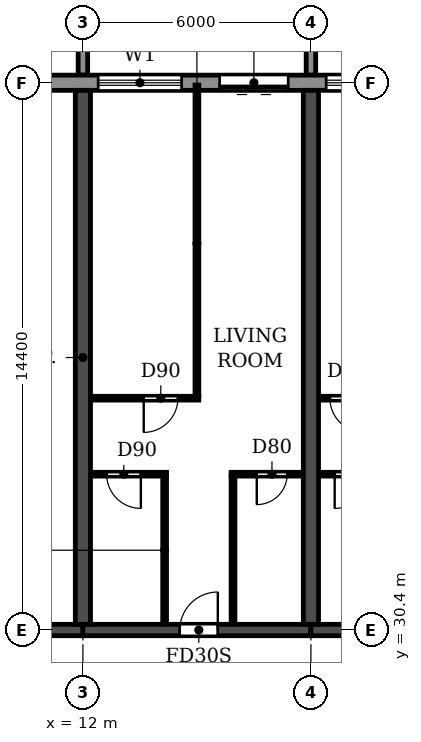
"""IFC4 building model, lengths in metres.
Left out: names, types, materials, properties, quantities, classifications, styles, units other than length and angle.
Written with IfcOpenShell. Run it as: python <this file> out.ifc"""

import sys

from ifc_helpers import new_model, si_unit, direction, frame, frame_2d, origin, place, context, subcontext, project, spatial, polyline, rectangle, outline, extrude, source, transform, mapped, element, fill, save


model = new_model("IFC4")
c1 = context("Model", 3, precision=1e-05, world=origin(), true_north=direction((0.0, 1.0)))
c2 = subcontext(c1, "Body", "Model", "MODEL_VIEW")
j1 = project(units=[si_unit("LENGTHUNIT", "METRE"), si_unit("PLANEANGLEUNIT", "RADIAN")], contexts=[c1])
p1 = place(None, origin())
s1 = spatial("IfcSite", under=j1, at=p1, CompositionType="ELEMENT")
p2 = place(p1, origin())
s2 = spatial("IfcBuilding", under=s1, at=p2, CompositionType="ELEMENT")
p3 = place(p2, frame((0.0, 0.0, 56.4)))
s3 = spatial("IfcBuildingStorey", under=s2, at=p3, CompositionType="ELEMENT", Elevation=56.4)
for number, where, z_axis, x_axis in (
    (1, (12.0, 30.55, 0.0), (0.0, 0.0, 1.0), (0.0, 1.0, 0.0)),
    (2, (18.0, 30.55, 0.0), (0.0, 0.0, 1.0), (0.0, 1.0, 0.0)),
):
    element("IfcWall", number, at=place(p3, frame(where, z_axis=z_axis, x_axis=x_axis)), inside=s3, PredefinedType="SHEAR", context=c2, shape_type="SweptSolid", body=[
        extrude(rectangle(XDim=14.05, YDim=0.4, at=frame_2d((7.025, 0.0))), origin(), (0.0, 0.0, 1.0), 3.05),
    ])
p4 = place(p3, frame((6.2, 30.4, 0.0), z_axis=(0.0, 0.0, 1.0), x_axis=(1.0, 0.0, 0.0)))
e3 = element("IfcWall", 3, at=p4, inside=s3, PredefinedType="SHEAR", context=c2, shape_type="SweptSolid", body=[
    extrude(rectangle(XDim=5.8, YDim=0.3, at=frame_2d((2.9, 0.0))), origin(), (0.0, 0.0, 1.0), 2.45),
])
p5 = place(p4, frame((2.3, 0.0, 0.0)))
e4 = element("IfcOpeningElement", 4, at=p5, cuts=e3, PredefinedType="OPENING", context=c2, shape_type="SweptSolid", body=[
    extrude(rectangle(XDim=1.0, YDim=2.1, at=frame_2d((0.5, 1.05))), frame((0.0, 0.16, 0.0), z_axis=(0.0, -1.0, 0.0), x_axis=(1.0, 0.0, 0.0)), (0.0, 0.0, 1.0), 0.32),
])
p6 = place(p3, frame((12.0, 30.4, 0.0), z_axis=(0.0, 0.0, 1.0), x_axis=(1.0, 0.0, 0.0)))
e5 = element("IfcWall", 5, at=p6, inside=s3, PredefinedType="SHEAR", context=c2, shape_type="SweptSolid", body=[
    extrude(rectangle(XDim=6.0, YDim=0.3, at=frame_2d((3.0, 0.0))), origin(), (0.0, 0.0, 1.0), 2.45),
])
p7 = place(p6, frame((2.55, 0.0, 0.0)))
e6 = element("IfcOpeningElement", 6, at=p7, cuts=e5, PredefinedType="OPENING", context=c2, shape_type="SweptSolid", body=[
    extrude(rectangle(XDim=1.0, YDim=2.1, at=frame_2d((0.5, 1.05))), frame((0.0, 0.16, 0.0), z_axis=(0.0, -1.0, 0.0), x_axis=(1.0, 0.0, 0.0)), (0.0, 0.0, 1.0), 0.32),
])
p8 = place(p3, frame((18.0, 30.4, 0.0), z_axis=(0.0, 0.0, 1.0), x_axis=(1.0, 0.0, 0.0)))
e7 = element("IfcWall", 7, at=p8, inside=s3, PredefinedType="SHEAR", context=c2, shape_type="SweptSolid", body=[
    extrude(rectangle(XDim=6.0, YDim=0.3, at=frame_2d((3.0, 0.0))), origin(), (0.0, 0.0, 1.0), 2.45),
])
p9 = place(p8, frame((2.55, 0.0, 0.0)))
e8 = element("IfcOpeningElement", 8, at=p9, cuts=e7, PredefinedType="OPENING", context=c2, shape_type="SweptSolid", body=[
    extrude(rectangle(XDim=1.0, YDim=2.1, at=frame_2d((0.5, 1.05))), frame((0.0, 0.16, 0.0), z_axis=(0.0, -1.0, 0.0), x_axis=(1.0, 0.0, 0.0)), (0.0, 0.0, 1.0), 0.32),
])
p10 = place(p3, frame((91.317, 44.8, 0.0), z_axis=(0.0, 0.0, 1.0), x_axis=(-1.0, 0.0, 0.0)))
e9 = element("IfcWall", 9, at=p10, inside=s3, PredefinedType="STANDARD", context=c2, shape_type="SweptSolid", body=[
    extrude(rectangle(XDim=80.634, YDim=0.4, at=frame_2d((40.317, 0.0))), origin(), (0.0, 0.0, 1.0), 3.05),
])
p11 = place(p10, frame((76.717, 0.0, 0.9)))
e10 = element("IfcOpeningElement", 10, at=p11, cuts=e9, PredefinedType="OPENING", context=c2, shape_type="SweptSolid", body=[
    extrude(rectangle(XDim=2.2, YDim=1.5, at=frame_2d((1.1, 0.75))), frame((0.0, 0.21, 0.0), z_axis=(0.0, -1.0, 0.0), x_axis=(1.0, 0.0, 0.0)), (0.0, 0.0, 1.0), 0.42),
])
p12 = place(p10, frame((73.917, 0.0, 0.0)))
e11 = element("IfcOpeningElement", 11, at=p12, cuts=e9, PredefinedType="OPENING", context=c2, shape_type="SweptSolid", body=[
    extrude(rectangle(XDim=1.8, YDim=2.4, at=frame_2d((0.9, 1.2))), frame((0.0, 0.21, 0.0), z_axis=(0.0, -1.0, 0.0), x_axis=(1.0, 0.0, 0.0)), (0.0, 0.0, 1.0), 0.42),
])
p13 = place(p10, frame((70.717, 0.0, 0.9)))
e12 = element("IfcOpeningElement", 12, at=p13, cuts=e9, PredefinedType="OPENING", context=c2, shape_type="SweptSolid", body=[
    extrude(rectangle(XDim=2.2, YDim=1.5, at=frame_2d((1.1, 0.75))), frame((0.0, 0.21, 0.0), z_axis=(0.0, -1.0, 0.0), x_axis=(1.0, 0.0, 0.0)), (0.0, 0.0, 1.0), 0.42),
])
p14 = place(p10, frame((67.917, 0.0, 0.0)))
e13 = element("IfcOpeningElement", 13, at=p14, cuts=e9, PredefinedType="OPENING", context=c2, shape_type="SweptSolid", body=[
    extrude(rectangle(XDim=1.8, YDim=2.4, at=frame_2d((0.9, 1.2))), frame((0.0, 0.21, 0.0), z_axis=(0.0, -1.0, 0.0), x_axis=(1.0, 0.0, 0.0)), (0.0, 0.0, 1.0), 0.42),
])
p15 = place(p10, frame((64.717, 0.0, 0.9)))
e14 = element("IfcOpeningElement", 14, at=p15, cuts=e9, PredefinedType="OPENING", context=c2, shape_type="SweptSolid", body=[
    extrude(rectangle(XDim=2.2, YDim=1.5, at=frame_2d((1.1, 0.75))), frame((0.0, 0.21, 0.0), z_axis=(0.0, -1.0, 0.0), x_axis=(1.0, 0.0, 0.0)), (0.0, 0.0, 1.0), 0.42),
])
p16 = place(p10, frame((61.917, 0.0, 0.0)))
e15 = element("IfcOpeningElement", 15, at=p16, cuts=e9, PredefinedType="OPENING", context=c2, shape_type="SweptSolid", body=[
    extrude(rectangle(XDim=1.8, YDim=2.4, at=frame_2d((0.9, 1.2))), frame((0.0, 0.21, 0.0), z_axis=(0.0, -1.0, 0.0), x_axis=(1.0, 0.0, 0.0)), (0.0, 0.0, 1.0), 0.42),
])
p17 = place(p10, frame((58.717, 0.0, 0.9)))
e16 = element("IfcOpeningElement", 16, at=p17, cuts=e9, PredefinedType="OPENING", context=c2, shape_type="SweptSolid", body=[
    extrude(rectangle(XDim=2.2, YDim=1.5, at=frame_2d((1.1, 0.75))), frame((0.0, 0.21, 0.0), z_axis=(0.0, -1.0, 0.0), x_axis=(1.0, 0.0, 0.0)), (0.0, 0.0, 1.0), 0.42),
])
p18 = place(p10, frame((55.717, 0.0, 0.9)))
e17 = element("IfcOpeningElement", 17, at=p18, cuts=e9, PredefinedType="OPENING", context=c2, shape_type="SweptSolid", body=[
    extrude(rectangle(XDim=2.2, YDim=1.5, at=frame_2d((1.1, 0.75))), frame((0.0, 0.21, 0.0), z_axis=(0.0, -1.0, 0.0), x_axis=(1.0, 0.0, 0.0)), (0.0, 0.0, 1.0), 0.42),
])
p19 = place(p10, frame((52.917, 0.0, 0.0)))
e18 = element("IfcOpeningElement", 18, at=p19, cuts=e9, PredefinedType="OPENING", context=c2, shape_type="SweptSolid", body=[
    extrude(rectangle(XDim=1.8, YDim=2.4, at=frame_2d((0.9, 1.2))), frame((0.0, 0.21, 0.0), z_axis=(0.0, -1.0, 0.0), x_axis=(1.0, 0.0, 0.0)), (0.0, 0.0, 1.0), 0.42),
])
p20 = place(p10, frame((49.717, 0.0, 0.9)))
e19 = element("IfcOpeningElement", 19, at=p20, cuts=e9, PredefinedType="OPENING", context=c2, shape_type="SweptSolid", body=[
    extrude(rectangle(XDim=2.2, YDim=1.5, at=frame_2d((1.1, 0.75))), frame((0.0, 0.21, 0.0), z_axis=(0.0, -1.0, 0.0), x_axis=(1.0, 0.0, 0.0)), (0.0, 0.0, 1.0), 0.42),
])
p21 = place(p10, frame((46.917, 0.0, 0.0)))
e20 = element("IfcOpeningElement", 20, at=p21, cuts=e9, PredefinedType="OPENING", context=c2, shape_type="SweptSolid", body=[
    extrude(rectangle(XDim=1.8, YDim=2.4, at=frame_2d((0.9, 1.2))), frame((0.0, 0.21, 0.0), z_axis=(0.0, -1.0, 0.0), x_axis=(1.0, 0.0, 0.0)), (0.0, 0.0, 1.0), 0.42),
])
p22 = place(p10, frame((43.717, 0.0, 0.9)))
e21 = element("IfcOpeningElement", 21, at=p22, cuts=e9, PredefinedType="OPENING", context=c2, shape_type="SweptSolid", body=[
    extrude(rectangle(XDim=2.2, YDim=1.5, at=frame_2d((1.1, 0.75))), frame((0.0, 0.21, 0.0), z_axis=(0.0, -1.0, 0.0), x_axis=(1.0, 0.0, 0.0)), (0.0, 0.0, 1.0), 0.42),
])
p23 = place(p10, frame((40.717, 0.0, 0.9)))
e22 = element("IfcOpeningElement", 22, at=p23, cuts=e9, PredefinedType="OPENING", context=c2, shape_type="SweptSolid", body=[
    extrude(rectangle(XDim=2.2, YDim=1.5, at=frame_2d((1.1, 0.75))), frame((0.0, 0.21, 0.0), z_axis=(0.0, -1.0, 0.0), x_axis=(1.0, 0.0, 0.0)), (0.0, 0.0, 1.0), 0.42),
])
p24 = place(p10, frame((37.717, 0.0, 0.9)))
e23 = element("IfcOpeningElement", 23, at=p24, cuts=e9, PredefinedType="OPENING", context=c2, shape_type="SweptSolid", body=[
    extrude(rectangle(XDim=2.2, YDim=1.5, at=frame_2d((1.1, 0.75))), frame((0.0, 0.21, 0.0), z_axis=(0.0, -1.0, 0.0), x_axis=(1.0, 0.0, 0.0)), (0.0, 0.0, 1.0), 0.42),
])
p25 = place(p10, frame((34.717, 0.0, 0.9)))
e24 = element("IfcOpeningElement", 24, at=p25, cuts=e9, PredefinedType="OPENING", context=c2, shape_type="SweptSolid", body=[
    extrude(rectangle(XDim=2.2, YDim=1.5, at=frame_2d((1.1, 0.75))), frame((0.0, 0.21, 0.0), z_axis=(0.0, -1.0, 0.0), x_axis=(1.0, 0.0, 0.0)), (0.0, 0.0, 1.0), 0.42),
])
p26 = place(p10, frame((31.917, 0.0, 0.0)))
e25 = element("IfcOpeningElement", 25, at=p26, cuts=e9, PredefinedType="OPENING", context=c2, shape_type="SweptSolid", body=[
    extrude(rectangle(XDim=1.8, YDim=2.4, at=frame_2d((0.9, 1.2))), frame((0.0, 0.21, 0.0), z_axis=(0.0, -1.0, 0.0), x_axis=(1.0, 0.0, 0.0)), (0.0, 0.0, 1.0), 0.42),
])
p27 = place(p10, frame((28.917, 0.0, 0.0)))
e26 = element("IfcOpeningElement", 26, at=p27, cuts=e9, PredefinedType="OPENING", context=c2, shape_type="SweptSolid", body=[
    extrude(rectangle(XDim=1.8, YDim=2.4, at=frame_2d((0.9, 1.2))), frame((0.0, 0.21, 0.0), z_axis=(0.0, -1.0, 0.0), x_axis=(1.0, 0.0, 0.0)), (0.0, 0.0, 1.0), 0.42),
])
p28 = place(p10, frame((25.717, 0.0, 0.9)))
e27 = element("IfcOpeningElement", 27, at=p28, cuts=e9, PredefinedType="OPENING", context=c2, shape_type="SweptSolid", body=[
    extrude(rectangle(XDim=2.2, YDim=1.5, at=frame_2d((1.1, 0.75))), frame((0.0, 0.21, 0.0), z_axis=(0.0, -1.0, 0.0), x_axis=(1.0, 0.0, 0.0)), (0.0, 0.0, 1.0), 0.42),
])
p29 = place(p10, frame((22.917, 0.0, 0.0)))
e28 = element("IfcOpeningElement", 28, at=p29, cuts=e9, PredefinedType="OPENING", context=c2, shape_type="SweptSolid", body=[
    extrude(rectangle(XDim=1.8, YDim=2.4, at=frame_2d((0.9, 1.2))), frame((0.0, 0.21, 0.0), z_axis=(0.0, -1.0, 0.0), x_axis=(1.0, 0.0, 0.0)), (0.0, 0.0, 1.0), 0.42),
])
p30 = place(p10, frame((19.717, 0.0, 0.9)))
e29 = element("IfcOpeningElement", 29, at=p30, cuts=e9, PredefinedType="OPENING", context=c2, shape_type="SweptSolid", body=[
    extrude(rectangle(XDim=2.2, YDim=1.5, at=frame_2d((1.1, 0.75))), frame((0.0, 0.21, 0.0), z_axis=(0.0, -1.0, 0.0), x_axis=(1.0, 0.0, 0.0)), (0.0, 0.0, 1.0), 0.42),
])
p31 = place(p10, frame((16.917, 0.0, 0.0)))
e30 = element("IfcOpeningElement", 30, at=p31, cuts=e9, PredefinedType="OPENING", context=c2, shape_type="SweptSolid", body=[
    extrude(rectangle(XDim=1.8, YDim=2.4, at=frame_2d((0.9, 1.2))), frame((0.0, 0.21, 0.0), z_axis=(0.0, -1.0, 0.0), x_axis=(1.0, 0.0, 0.0)), (0.0, 0.0, 1.0), 0.42),
])
p32 = place(p10, frame((13.717, 0.0, 0.9)))
e31 = element("IfcOpeningElement", 31, at=p32, cuts=e9, PredefinedType="OPENING", context=c2, shape_type="SweptSolid", body=[
    extrude(rectangle(XDim=2.2, YDim=1.5, at=frame_2d((1.1, 0.75))), frame((0.0, 0.21, 0.0), z_axis=(0.0, -1.0, 0.0), x_axis=(1.0, 0.0, 0.0)), (0.0, 0.0, 1.0), 0.42),
])
p33 = place(p10, frame((10.917, 0.0, 0.0)))
e32 = element("IfcOpeningElement", 32, at=p33, cuts=e9, PredefinedType="OPENING", context=c2, shape_type="SweptSolid", body=[
    extrude(rectangle(XDim=1.8, YDim=2.4, at=frame_2d((0.9, 1.2))), frame((0.0, 0.21, 0.0), z_axis=(0.0, -1.0, 0.0), x_axis=(1.0, 0.0, 0.0)), (0.0, 0.0, 1.0), 0.42),
])
p34 = place(p10, frame((7.717, 0.0, 0.9)))
e33 = element("IfcOpeningElement", 33, at=p34, cuts=e9, PredefinedType="OPENING", context=c2, shape_type="SweptSolid", body=[
    extrude(rectangle(XDim=2.2, YDim=1.5, at=frame_2d((1.1, 0.75))), frame((0.0, 0.21, 0.0), z_axis=(0.0, -1.0, 0.0), x_axis=(1.0, 0.0, 0.0)), (0.0, 0.0, 1.0), 0.42),
])
p35 = place(p10, frame((4.717, 0.0, 0.9)))
e34 = element("IfcOpeningElement", 34, at=p35, cuts=e9, PredefinedType="OPENING", context=c2, shape_type="SweptSolid", body=[
    extrude(rectangle(XDim=2.2, YDim=1.5, at=frame_2d((1.1, 0.75))), frame((0.0, 0.21, 0.0), z_axis=(0.0, -1.0, 0.0), x_axis=(1.0, 0.0, 0.0)), (0.0, 0.0, 1.0), 0.42),
])
p36 = place(p10, frame((1.717, 0.0, 0.9)))
e35 = element("IfcOpeningElement", 35, at=p36, cuts=e9, PredefinedType="OPENING", context=c2, shape_type="SweptSolid", body=[
    extrude(rectangle(XDim=2.2, YDim=1.5, at=frame_2d((1.1, 0.75))), frame((0.0, 0.21, 0.0), z_axis=(0.0, -1.0, 0.0), x_axis=(1.0, 0.0, 0.0)), (0.0, 0.0, 1.0), 0.42),
])
m1 = source(origin(), c2, "Body", "SweptSolid", [
    extrude(outline(polyline([(0.0, 0.0), (0.25, 0.0), (0.25, 3.1), (0.0, 3.1), (0.0, 0.0)])), origin(), (0.0, 0.0, 1.0), 3.1),
])
for number, where in (
    (36, (11.875, 45.0, 0.0)),
    (37, (17.875, 45.0, 0.0)),
):
    element("IfcWall", number, at=place(p3, frame(where)), inside=s3, PredefinedType="STANDARD", context=c2, shape_type="MappedRepresentation", body=[
        mapped(m1, transform((0.0, 0.0, 0.0))),
    ])
p37 = place(p3, frame((12.21, 34.5, 0.0), z_axis=(0.0, 0.0, 1.0), x_axis=(1.0, 0.0, 0.0)))
e38 = element("IfcWall", 38, at=p37, inside=s3, PredefinedType="PARTITIONING", context=c2, shape_type="SweptSolid", body=[
    extrude(rectangle(XDim=1.99, YDim=0.1, at=frame_2d((0.995, 0.0))), origin(), (0.0, 0.0, 1.0), 3.05),
])
p38 = place(p37, frame((0.415, 0.0, 0.0)))
e39 = element("IfcOpeningElement", 39, at=p38, cuts=e38, PredefinedType="OPENING", context=c2, shape_type="SweptSolid", body=[
    extrude(rectangle(XDim=0.9, YDim=2.1, at=frame_2d((0.45, 1.05))), frame((0.0, 0.06, 0.0), z_axis=(0.0, -1.0, 0.0), x_axis=(1.0, 0.0, 0.0)), (0.0, 0.0, 1.0), 0.12),
])
p39 = place(p3, frame((15.9, 34.5, 0.0), z_axis=(0.0, 0.0, 1.0), x_axis=(1.0, 0.0, 0.0)))
e40 = element("IfcWall", 40, at=p39, inside=s3, PredefinedType="PARTITIONING", context=c2, shape_type="SweptSolid", body=[
    extrude(rectangle(XDim=1.89, YDim=0.1, at=frame_2d((0.945, 0.0))), origin(), (0.0, 0.0, 1.0), 3.05),
])
p40 = place(p39, frame((0.675, 0.0, 0.0)))
e41 = element("IfcOpeningElement", 41, at=p40, cuts=e40, PredefinedType="OPENING", context=c2, shape_type="SweptSolid", body=[
    extrude(rectangle(XDim=0.8, YDim=2.1, at=frame_2d((0.4, 1.05))), frame((0.0, 0.06, 0.0), z_axis=(0.0, -1.0, 0.0), x_axis=(1.0, 0.0, 0.0)), (0.0, 0.0, 1.0), 0.12),
])
p41 = place(p3, frame((18.21, 34.5, 0.0), z_axis=(0.0, 0.0, 1.0), x_axis=(1.0, 0.0, 0.0)))
e42 = element("IfcWall", 42, at=p41, inside=s3, PredefinedType="PARTITIONING", context=c2, shape_type="SweptSolid", body=[
    extrude(rectangle(XDim=1.99, YDim=0.1, at=frame_2d((0.995, 0.0))), origin(), (0.0, 0.0, 1.0), 3.05),
])
p42 = place(p41, frame((0.415, 0.0, 0.0)))
e43 = element("IfcOpeningElement", 43, at=p42, cuts=e42, PredefinedType="OPENING", context=c2, shape_type="SweptSolid", body=[
    extrude(rectangle(XDim=0.9, YDim=2.1, at=frame_2d((0.45, 1.05))), frame((0.0, 0.06, 0.0), z_axis=(0.0, -1.0, 0.0), x_axis=(1.0, 0.0, 0.0)), (0.0, 0.0, 1.0), 0.12),
])
p43 = place(p3, frame((12.21, 36.5, 0.0), z_axis=(0.0, 0.0, 1.0), x_axis=(1.0, 0.0, 0.0)))
e44 = element("IfcWall", 44, at=p43, inside=s3, PredefinedType="PARTITIONING", context=c2, shape_type="SweptSolid", body=[
    extrude(rectangle(XDim=2.84, YDim=0.1, at=frame_2d((1.42, 0.0))), origin(), (0.0, 0.0, 1.0), 3.05),
])
p44 = place(p43, frame((1.39, 0.0, 0.0)))
e45 = element("IfcOpeningElement", 45, at=p44, cuts=e44, PredefinedType="OPENING", context=c2, shape_type="SweptSolid", body=[
    extrude(rectangle(XDim=0.9, YDim=2.1, at=frame_2d((0.45, 1.05))), frame((0.0, 0.06, 0.0), z_axis=(0.0, -1.0, 0.0), x_axis=(1.0, 0.0, 0.0)), (0.0, 0.0, 1.0), 0.12),
])
p45 = place(p3, frame((18.21, 36.5, 0.0), z_axis=(0.0, 0.0, 1.0), x_axis=(1.0, 0.0, 0.0)))
e46 = element("IfcWall", 46, at=p45, inside=s3, PredefinedType="PARTITIONING", context=c2, shape_type="SweptSolid", body=[
    extrude(rectangle(XDim=2.84, YDim=0.1, at=frame_2d((1.42, 0.0))), origin(), (0.0, 0.0, 1.0), 3.05),
])
p46 = place(p45, frame((0.29, 0.0, 0.0)))
e47 = element("IfcOpeningElement", 47, at=p46, cuts=e46, PredefinedType="OPENING", context=c2, shape_type="SweptSolid", body=[
    extrude(rectangle(XDim=0.9, YDim=2.1, at=frame_2d((0.45, 1.05))), frame((0.0, 0.06, 0.0), z_axis=(0.0, -1.0, 0.0), x_axis=(1.0, 0.0, 0.0)), (0.0, 0.0, 1.0), 0.12),
])
p47 = place(p3, frame((14.15, 30.56, 0.0), z_axis=(0.0, 0.0, 1.0), x_axis=(0.0, 1.0, 0.0)))
e48 = element("IfcWall", 48, at=p47, inside=s3, PredefinedType="PARTITIONING", context=c2, shape_type="SweptSolid", body=[
    extrude(rectangle(XDim=3.89, YDim=0.1, at=frame_2d((1.945, 0.0))), origin(), (0.0, 0.0, 1.0), 3.05),
])
p48 = place(p3, frame((15.0, 36.55, 0.0), z_axis=(0.0, 0.0, 1.0), x_axis=(0.0, 1.0, 0.0)))
e49 = element("IfcWall", 49, at=p48, inside=s3, PredefinedType="PARTITIONING", context=c2, shape_type="SweptSolid", body=[
    extrude(rectangle(XDim=8.19, YDim=0.1, at=frame_2d((4.095, 0.0))), origin(), (0.0, 0.0, 1.0), 3.05),
])
p49 = place(p3, frame((15.95, 30.56, 0.0), z_axis=(0.0, 0.0, 1.0), x_axis=(0.0, 1.0, 0.0)))
e50 = element("IfcWall", 50, at=p49, inside=s3, PredefinedType="PARTITIONING", context=c2, shape_type="SweptSolid", body=[
    extrude(rectangle(XDim=3.89, YDim=0.1, at=frame_2d((1.945, 0.0))), origin(), (0.0, 0.0, 1.0), 3.05),
])
p50 = place(p11, origin())
e51 = element("IfcWindow", 51, at=p50, inside=s3, PartitioningType="DOUBLE_PANEL_HORIZONTAL", PredefinedType="WINDOW", context=c2, shape_type="SweptSolid", body=[
    extrude(rectangle(XDim=2.2, YDim=1.5, at=frame_2d((1.1, 0.75))), frame((0.0, 0.03, 0.0), z_axis=(0.0, -1.0, 0.0), x_axis=(1.0, 0.0, 0.0)), (0.0, 0.0, 1.0), 0.06),
])
fill(e10, e51)
p51 = place(p12, origin())
e52 = element("IfcDoor", 52, at=p51, inside=s3, OperationType="DOUBLE_DOOR_SLIDING", PredefinedType="DOOR", context=c2, shape_type="SweptSolid", body=[
    extrude(rectangle(XDim=1.8, YDim=2.4, at=frame_2d((0.9, 1.2))), frame((0.0, 0.025, 0.0), z_axis=(0.0, -1.0, 0.0), x_axis=(1.0, 0.0, 0.0)), (0.0, 0.0, 1.0), 0.05),
])
fill(e11, e52)
p52 = place(p13, origin())
e53 = element("IfcWindow", 53, at=p52, inside=s3, PartitioningType="DOUBLE_PANEL_HORIZONTAL", PredefinedType="WINDOW", context=c2, shape_type="SweptSolid", body=[
    extrude(rectangle(XDim=2.2, YDim=1.5, at=frame_2d((1.1, 0.75))), frame((0.0, 0.03, 0.0), z_axis=(0.0, -1.0, 0.0), x_axis=(1.0, 0.0, 0.0)), (0.0, 0.0, 1.0), 0.06),
])
fill(e12, e53)
p53 = place(p38, frame((0.9, 0.0, 0.0), z_axis=(0.0, 0.0, 1.0), x_axis=(-1.0, 0.0, 0.0)))
e54 = element("IfcDoor", 54, at=p53, inside=s3, OperationType="SINGLE_SWING_LEFT", PredefinedType="DOOR", context=c2, shape_type="SweptSolid", body=[
    extrude(rectangle(XDim=0.9, YDim=2.1, at=frame_2d((0.45, 1.05))), frame((0.0, 0.025, 0.0), z_axis=(0.0, -1.0, 0.0), x_axis=(1.0, 0.0, 0.0)), (0.0, 0.0, 1.0), 0.05),
])
fill(e39, e54)
p54 = place(p44, frame((0.9, 0.0, 0.0), z_axis=(0.0, 0.0, 1.0), x_axis=(-1.0, 0.0, 0.0)))
e55 = element("IfcDoor", 55, at=p54, inside=s3, OperationType="SINGLE_SWING_RIGHT", PredefinedType="DOOR", context=c2, shape_type="SweptSolid", body=[
    extrude(rectangle(XDim=0.9, YDim=2.1, at=frame_2d((0.45, 1.05))), frame((0.0, 0.025, 0.0), z_axis=(0.0, -1.0, 0.0), x_axis=(1.0, 0.0, 0.0)), (0.0, 0.0, 1.0), 0.05),
])
fill(e45, e55)
p55 = place(p7, origin())
e56 = element("IfcDoor", 56, at=p55, inside=s3, OperationType="SINGLE_SWING_RIGHT", PredefinedType="DOOR", context=c2, shape_type="SweptSolid", body=[
    extrude(rectangle(XDim=1.0, YDim=2.1, at=frame_2d((0.5, 1.05))), frame((0.0, 0.025, 0.0), z_axis=(0.0, -1.0, 0.0), x_axis=(1.0, 0.0, 0.0)), (0.0, 0.0, 1.0), 0.05),
])
fill(e6, e56)
p56 = place(p40, frame((0.8, 0.0, 0.0), z_axis=(0.0, 0.0, 1.0), x_axis=(-1.0, 0.0, 0.0)))
e57 = element("IfcDoor", 57, at=p56, inside=s3, OperationType="SINGLE_SWING_RIGHT", PredefinedType="DOOR", context=c2, shape_type="SweptSolid", body=[
    extrude(rectangle(XDim=0.8, YDim=2.1, at=frame_2d((0.4, 1.05))), frame((0.0, 0.025, 0.0), z_axis=(0.0, -1.0, 0.0), x_axis=(1.0, 0.0, 0.0)), (0.0, 0.0, 1.0), 0.05),
])
fill(e41, e57)
p57 = place(p46, frame((0.9, 0.0, 0.0), z_axis=(0.0, 0.0, 1.0), x_axis=(-1.0, 0.0, 0.0)))
e58 = element("IfcDoor", 58, at=p57, inside=s3, OperationType="SINGLE_SWING_LEFT", PredefinedType="DOOR", context=c2, shape_type="SweptSolid", body=[
    extrude(rectangle(XDim=0.9, YDim=2.1, at=frame_2d((0.45, 1.05))), frame((0.0, 0.025, 0.0), z_axis=(0.0, -1.0, 0.0), x_axis=(1.0, 0.0, 0.0)), (0.0, 0.0, 1.0), 0.05),
])
fill(e47, e58)
p58 = place(p42, frame((0.9, 0.0, 0.0), z_axis=(0.0, 0.0, 1.0), x_axis=(-1.0, 0.0, 0.0)))
e59 = element("IfcDoor", 59, at=p58, inside=s3, OperationType="SINGLE_SWING_RIGHT", PredefinedType="DOOR", context=c2, shape_type="SweptSolid", body=[
    extrude(rectangle(XDim=0.9, YDim=2.1, at=frame_2d((0.45, 1.05))), frame((0.0, 0.025, 0.0), z_axis=(0.0, -1.0, 0.0), x_axis=(1.0, 0.0, 0.0)), (0.0, 0.0, 1.0), 0.05),
])
fill(e43, e59)
save(model, sys.argv[1])
